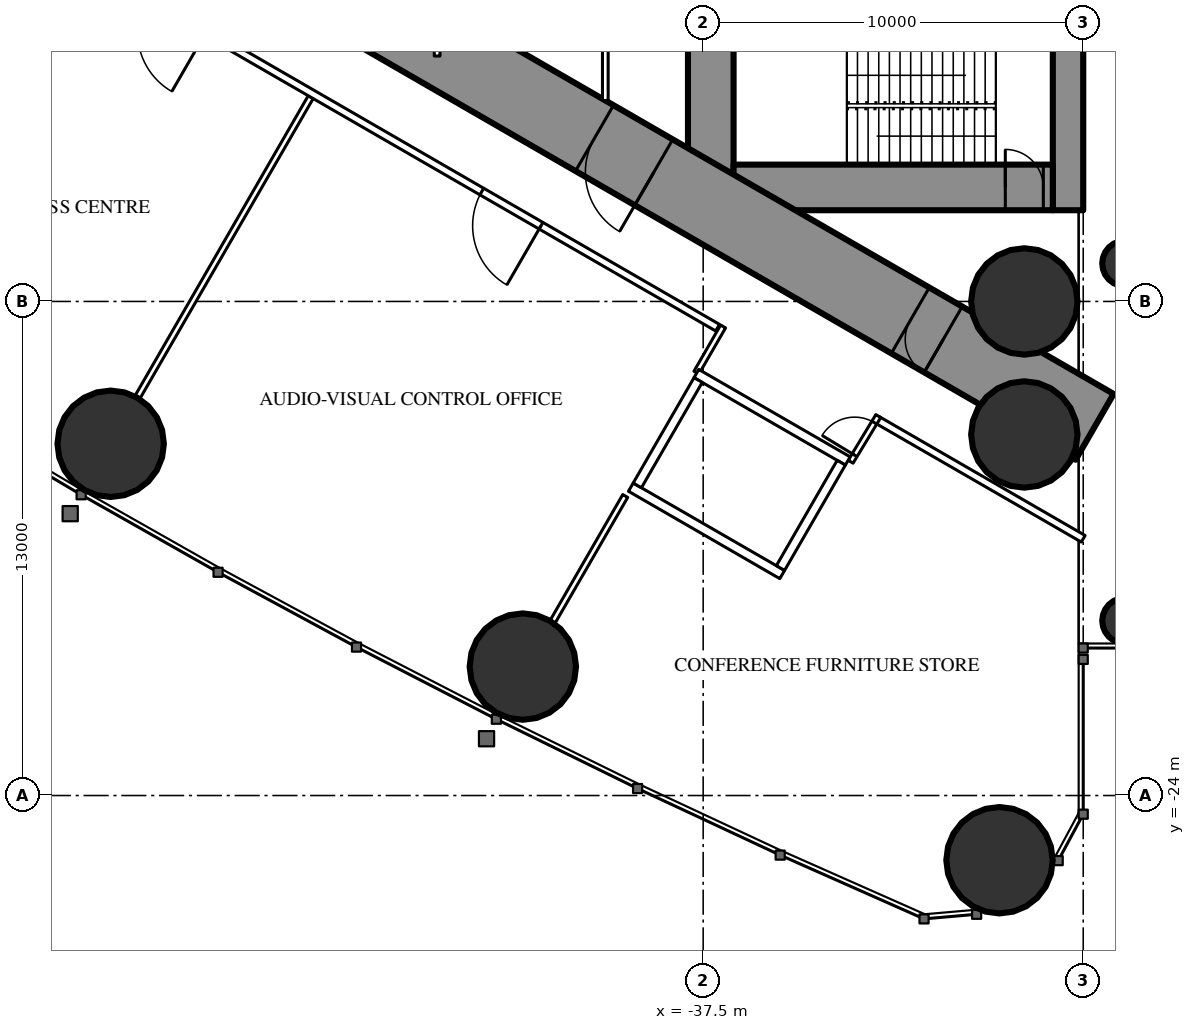
"""IFC4 building model, lengths in metres.
Left out: names, types, materials, properties, quantities, classifications, styles, units other than length and angle.
Written with IfcOpenShell. Run it as: python <this file> out.ifc"""

import sys

from ifc_helpers import new_model, si_unit, direction, frame, frame_2d, origin, origin_2d, place, context, subcontext, project, spatial, rectangle, circle, hollow_circle, extrude, element, fill, save


model = new_model("IFC4")
c1 = context("Model", 3, precision=1e-05, world=origin(), true_north=direction((0.0, 1.0)))
c2 = subcontext(c1, "Body", "Model", "MODEL_VIEW")
j1 = project(units=[si_unit("LENGTHUNIT", "METRE"), si_unit("PLANEANGLEUNIT", "RADIAN")], contexts=[c1])
p1 = place(None, origin())
s1 = spatial("IfcSite", under=j1, at=p1, CompositionType="ELEMENT")
p2 = place(p1, origin())
s2 = spatial("IfcBuilding", under=s1, at=p2, CompositionType="ELEMENT")
p3 = place(p2, frame((0.0, 0.0, 7.2)))
s3 = spatial("IfcBuildingStorey", under=s2, at=p3, CompositionType="ELEMENT", Elevation=7.2)
for number, where, z_axis, x_axis in (
    (1, (-29.703, -25.703, 0.0), (0.0, 0.0, 1.0), (1.0, 0.0, 0.0)),
    (2, (-29.05, -11.0, 0.0), (0.0, 0.0, 1.0), (1.0, 0.0, 0.0)),
    (3, (-29.05, -14.5, 0.0), (0.0, 0.0, 1.0), (1.0, 0.0, 0.0)),
    (4, (-53.09, -14.745, 0.0), (0.0, 0.0, 1.0), (1.0, 0.0, 0.0)),
    (5, (-42.245, -20.607, 0.0), (0.0, 0.0, 1.0), (1.0, 0.0, 0.0)),
):
    element("IfcColumn", number, at=place(p3, frame(where, z_axis=z_axis, x_axis=x_axis)), inside=s3, PredefinedType="COLUMN", context=c2, shape_type="SweptSolid", body=[
        extrude(hollow_circle(Radius=1.4, WallThickness=0.12, at=origin_2d()), origin(), (0.0, 0.0, 1.0), 5.4),
    ])
p4 = place(p3, frame((-27.9, 8.6, 0.0), z_axis=(0.0, 0.0, 1.0), x_axis=(0.0, -1.0, 0.0)))
e6 = element("IfcWall", 6, at=p4, inside=s3, PredefinedType="SHEAR", context=c2, shape_type="SweptSolid", body=[
    extrude(rectangle(XDim=17.2, YDim=0.8, at=frame_2d((8.6, 0.0))), origin(), (0.0, 0.0, 1.0), 5.4),
])
p5 = place(p3, frame((-37.3, 8.6, 0.0), z_axis=(0.0, 0.0, 1.0), x_axis=(0.0, -1.0, 0.0)))
e7 = element("IfcWall", 7, at=p5, inside=s3, PredefinedType="SHEAR", context=c2, shape_type="SweptSolid", body=[
    extrude(rectangle(XDim=17.2, YDim=1.2, at=frame_2d((8.6, 0.0))), origin(), (0.0, 0.0, 1.0), 5.4),
])
p6 = place(p5, frame((7.7, 0.0, 0.0)))
e8 = element("IfcOpeningElement", 8, at=p6, cuts=e7, PredefinedType="OPENING", context=c2, shape_type="SweptSolid", body=[
    extrude(rectangle(XDim=1.8, YDim=2.2, at=frame_2d((0.9, 1.1))), frame((0.0, 0.61, 0.0), z_axis=(0.0, -1.0, 0.0), x_axis=(1.0, 0.0, 0.0)), (0.0, 0.0, 1.0), 1.22),
])
p7 = place(p3, frame((-28.3, -8.0, 0.0), z_axis=(0.0, 0.0, 1.0), x_axis=(-1.0, 0.0, 0.0)))
e9 = element("IfcWall", 9, at=p7, inside=s3, PredefinedType="SHEAR", context=c2, shape_type="SweptSolid", body=[
    extrude(rectangle(XDim=8.4, YDim=1.2, at=frame_2d((4.2, 0.0))), origin(), (0.0, 0.0, 1.0), 5.4),
])
p8 = place(p7, frame((0.25, 0.0, 0.0)))
e10 = element("IfcOpeningElement", 10, at=p8, cuts=e9, PredefinedType="OPENING", context=c2, shape_type="SweptSolid", body=[
    extrude(rectangle(XDim=1.0, YDim=2.2, at=frame_2d((0.5, 1.1))), frame((0.0, 0.61, 0.0), z_axis=(0.0, -1.0, 0.0), x_axis=(1.0, 0.0, 0.0)), (0.0, 0.0, 1.0), 1.22),
])
p9 = place(p3, frame((-27.2, -14.3, 0.0), z_axis=(0.0, 0.0, 1.0), x_axis=(-0.866024044937, 0.500002353585, 0.0)))
e11 = element("IfcWall", 11, at=p9, inside=s3, PredefinedType="SHEAR", context=c2, shape_type="SweptSolid", body=[
    extrude(rectangle(XDim=27.533, YDim=2.0, at=frame_2d((13.767, 0.0))), origin(), (0.0, 0.0, 1.0), 5.4),
])
p10 = place(p9, frame((4.6, 0.0, 0.0)))
e12 = element("IfcOpeningElement", 12, at=p10, cuts=e11, PredefinedType="OPENING", context=c2, shape_type="SweptSolid", body=[
    extrude(rectangle(XDim=1.0, YDim=2.2, at=frame_2d((0.5, 1.1))), frame((0.0, 1.01, 0.0), z_axis=(0.0, -1.0, 0.0), x_axis=(1.0, 0.0, 0.0)), (0.0, 0.0, 1.0), 2.02),
])
p11 = place(p9, frame((13.395, 0.0, 0.0)))
e13 = element("IfcOpeningElement", 13, at=p11, cuts=e11, PredefinedType="OPENING", context=c2, shape_type="SweptSolid", body=[
    extrude(rectangle(XDim=1.8, YDim=2.2, at=frame_2d((0.9, 1.1))), frame((0.0, 1.01, 0.0), z_axis=(0.0, -1.0, 0.0), x_axis=(1.0, 0.0, 0.0)), (0.0, 0.0, 1.0), 2.02),
])
for number, where, z_axis, x_axis in (
    (14, (-26.4, -19.4, 0.0), (0.0, 0.0, 1.0), (1.0, 0.0, 0.0)),
    (15, (-26.4, -10.0, 0.0), (0.0, 0.0, 1.0), (1.0, 0.0, 0.0)),
):
    element("IfcColumn", number, at=place(p3, frame(where, z_axis=z_axis, x_axis=x_axis)), inside=s3, PredefinedType="COLUMN", context=c2, shape_type="SweptSolid", body=[
        extrude(circle(Radius=0.6, at=origin_2d()), origin(), (0.0, 0.0, 1.0), 5.4),
    ])
p12 = place(p3, frame((-47.827, -5.624, 0.0), z_axis=(0.0, 0.0, 1.0), x_axis=(-0.499995404498, -0.866028056982, 0.0)))
e16 = element("IfcWall", 16, at=p12, inside=s3, PredefinedType="PARTITIONING", context=c2, shape_type="SweptSolid", body=[
    extrude(rectangle(XDim=9.11, YDim=0.15, at=frame_2d((4.555, 0.0))), origin(), (0.0, 0.0, 1.0), 4.05),
])
p13 = place(p3, frame((-39.551, -16.118, 0.0), z_axis=(0.0, 0.0, 1.0), x_axis=(-0.499986503906, -0.866033195618, 0.0)))
e17 = element("IfcWall", 17, at=p13, inside=s3, PredefinedType="PARTITIONING", context=c2, shape_type="SweptSolid", body=[
    extrude(rectangle(XDim=3.815, YDim=0.15, at=frame_2d((1.907, 0.0))), origin(), (0.0, 0.0, 1.0), 5.05),
])
p14 = place(p3, frame((-27.5, -17.244, 0.0), z_axis=(0.0, 0.0, 1.0), x_axis=(-0.866027347857, 0.499996632752, 0.0)))
e18 = element("IfcWall", 18, at=p14, inside=s3, PredefinedType="PARTITIONING", context=c2, shape_type="SweptSolid", body=[
    extrude(rectangle(XDim=6.269, YDim=0.2, at=frame_2d((3.135, 0.0))), origin(), (0.0, 0.0, 1.0), 5.05),
])
p15 = place(p3, frame((-37.12, -11.69, 0.0), z_axis=(0.0, 0.0, 1.0), x_axis=(-0.866028803602, 0.499994111297, 0.0)))
e19 = element("IfcWall", 19, at=p15, inside=s3, PredefinedType="PARTITIONING", context=c2, shape_type="SweptSolid", body=[
    extrude(rectangle(XDim=23.26, YDim=0.2, at=frame_2d((11.63, 0.0))), origin(), (0.0, 0.0, 1.0), 5.05),
])
p16 = place(p15, frame((20.909, 0.0, 0.0)))
e20 = element("IfcOpeningElement", 20, at=p16, cuts=e19, PredefinedType="OPENING", context=c2, shape_type="SweptSolid", body=[
    extrude(rectangle(XDim=1.8, YDim=2.2, at=frame_2d((0.9, 1.1))), frame((0.0, 0.11, 0.0), z_axis=(0.0, -1.0, 0.0), x_axis=(1.0, 0.0, 0.0)), (0.0, 0.0, 1.0), 0.22),
])
p17 = place(p15, frame((15.544, 0.0, 0.0)))
e21 = element("IfcOpeningElement", 21, at=p17, cuts=e19, PredefinedType="OPENING", context=c2, shape_type="SweptSolid", body=[
    extrude(rectangle(XDim=1.8, YDim=2.2, at=frame_2d((0.9, 1.1))), frame((0.0, 0.11, 0.0), z_axis=(0.0, -1.0, 0.0), x_axis=(1.0, 0.0, 0.0)), (0.0, 0.0, 1.0), 0.22),
])
p18 = place(p15, frame((5.365, 0.0, 0.0)))
e22 = element("IfcOpeningElement", 22, at=p18, cuts=e19, PredefinedType="OPENING", context=c2, shape_type="SweptSolid", body=[
    extrude(rectangle(XDim=1.8, YDim=2.2, at=frame_2d((0.9, 1.1))), frame((0.0, 0.11, 0.0), z_axis=(0.0, -1.0, 0.0), x_axis=(1.0, 0.0, 0.0)), (0.0, 0.0, 1.0), 0.22),
])
p19 = place(p3, frame((-36.976, -11.658, 0.0), z_axis=(0.0, 0.0, 1.0), x_axis=(-0.50008355685, -0.86597715684, 0.0)))
e23 = element("IfcWall", 23, at=p19, inside=s3, PredefinedType="PARTITIONING", context=c2, shape_type="SweptSolid", body=[
    extrude(rectangle(XDim=1.405, YDim=0.15, at=frame_2d((0.702, 0.0))), origin(), (0.0, 0.0, 1.0), 5.05),
])
p20 = place(p3, frame((-33.621, -15.218, 0.0), z_axis=(0.0, 0.0, 1.0), x_axis=(0.518424923641, 0.855123148177, 0.0)))
e24 = element("IfcWall", 24, at=p20, inside=s3, PredefinedType="PARTITIONING", context=c2, shape_type="SweptSolid", body=[
    extrude(rectangle(XDim=1.405, YDim=0.15, at=frame_2d((0.703, 0.0))), origin(), (0.0, 0.0, 1.0), 5.05),
])
p21 = place(p20, frame((0.203, 0.0, 0.0)))
e25 = element("IfcOpeningElement", 25, at=p21, cuts=e24, PredefinedType="OPENING", context=c2, shape_type="SweptSolid", body=[
    extrude(rectangle(XDim=1.0, YDim=2.2, at=frame_2d((0.5, 1.1))), frame((0.0, 0.085, 0.0), z_axis=(0.0, -1.0, 0.0), x_axis=(1.0, 0.0, 0.0)), (0.0, 0.0, 1.0), 0.17),
])
p22 = place(p3, frame((-40.075, 5.712, 0.0), z_axis=(0.0, 0.0, 1.0), x_axis=(0.0, -1.0, 0.0)))
e26 = element("IfcWall", 26, at=p22, inside=s3, PredefinedType="PARTITIONING", context=c2, shape_type="SweptSolid", body=[
    extrude(rectangle(XDim=11.424, YDim=0.15, at=frame_2d((5.712, 0.0))), origin(), (0.0, 0.0, 1.0), 5.05),
])
p23 = place(p22, frame((4.812, 0.0, 0.0)))
e27 = element("IfcOpeningElement", 27, at=p23, cuts=e26, PredefinedType="OPENING", context=c2, shape_type="SweptSolid", body=[
    extrude(rectangle(XDim=1.8, YDim=2.2, at=frame_2d((0.9, 1.1))), frame((0.0, 0.085, 0.0), z_axis=(0.0, -1.0, 0.0), x_axis=(1.0, 0.0, 0.0)), (0.0, 0.0, 1.0), 0.17),
])
p24 = place(p3, frame((-44.5, 4.543, 0.0), z_axis=(0.0, 0.0, 1.0), x_axis=(0.0, -1.0, 0.0)))
e28 = element("IfcWall", 28, at=p24, inside=s3, PredefinedType="PARTITIONING", context=c2, shape_type="SweptSolid", body=[
    extrude(rectangle(XDim=9.085, YDim=0.15, at=frame_2d((4.543, 0.0))), origin(), (0.0, 0.0, 1.0), 5.05),
])
p25 = place(p24, frame((4.043, 0.0, 0.0)))
e29 = element("IfcOpeningElement", 29, at=p25, cuts=e28, PredefinedType="OPENING", context=c2, shape_type="SweptSolid", body=[
    extrude(rectangle(XDim=1.0, YDim=2.2, at=frame_2d((0.5, 1.1))), frame((0.0, 0.085, 0.0), z_axis=(0.0, -1.0, 0.0), x_axis=(1.0, 0.0, 0.0)), (0.0, 0.0, 1.0), 0.17),
])
p26 = place(p3, frame((-33.696, -15.197, 0.0), z_axis=(0.0, 0.0, 1.0), x_axis=(-0.865976953817, 0.500083908417, 0.0)))
e30 = element("IfcWall", 30, at=p26, inside=s3, PredefinedType="PARTITIONING", context=c2, shape_type="SweptSolid", body=[
    extrude(rectangle(XDim=4.599, YDim=0.25, at=frame_2d((2.3, 0.0))), origin(), (0.0, 0.0, 1.0), 5.05),
])
p27 = place(p3, frame((-35.42, -18.186, 0.0), z_axis=(0.0, 0.0, 1.0), x_axis=(-0.865990227814, 0.50006092162, 0.0)))
e31 = element("IfcWall", 31, at=p27, inside=s3, PredefinedType="PARTITIONING", context=c2, shape_type="SweptSolid", body=[
    extrude(rectangle(XDim=4.6, YDim=0.25, at=frame_2d((2.3, 0.0))), origin(), (0.0, 0.0, 1.0), 5.05),
])
p28 = place(p3, frame((-33.866, -15.243, 0.0), z_axis=(0.0, 0.0, 1.0), x_axis=(-0.499929347863, -0.866066190972, 0.0)))
e32 = element("IfcWall", 32, at=p28, inside=s3, PredefinedType="PARTITIONING", context=c2, shape_type="SweptSolid", body=[
    extrude(rectangle(XDim=3.201, YDim=0.25, at=frame_2d((1.6, 0.0))), origin(), (0.0, 0.0, 1.0), 5.05),
])
p29 = place(p3, frame((-37.633, -13.068, 0.0), z_axis=(0.0, 0.0, 1.0), x_axis=(-0.499872130319, -0.866099216793, 0.0)))
e33 = element("IfcWall", 33, at=p29, inside=s3, PredefinedType="PARTITIONING", context=c2, shape_type="SweptSolid", body=[
    extrude(rectangle(XDim=3.2, YDim=0.25, at=frame_2d((1.6, 0.0))), origin(), (0.0, 0.0, 1.0), 5.05),
])
p30 = place(p18, origin())
e34 = element("IfcDoor", 34, at=p30, inside=s3, OperationType="DOUBLE_DOOR_SINGLE_SWING", PredefinedType="DOOR", context=c2, shape_type="SweptSolid", body=[
    extrude(rectangle(XDim=1.8, YDim=2.2, at=frame_2d((0.9, 1.1))), frame((0.0, 0.025, 0.0), z_axis=(0.0, -1.0, 0.0), x_axis=(1.0, 0.0, 0.0)), (0.0, 0.0, 1.0), 0.05),
])
fill(e22, e34)
p31 = place(p21, origin())
e35 = element("IfcDoor", 35, at=p31, inside=s3, OperationType="SINGLE_SWING_LEFT", PredefinedType="DOOR", context=c2, shape_type="SweptSolid", body=[
    extrude(rectangle(XDim=1.0, YDim=2.2, at=frame_2d((0.5, 1.1))), frame((0.0, 0.025, 0.0), z_axis=(0.0, -1.0, 0.0), x_axis=(1.0, 0.0, 0.0)), (0.0, 0.0, 1.0), 0.05),
])
fill(e25, e35)
p32 = place(p10, origin())
e36 = element("IfcDoor", 36, at=p32, inside=s3, OperationType="SINGLE_SWING_LEFT", PredefinedType="DOOR", context=c2, shape_type="SweptSolid", body=[
    extrude(rectangle(XDim=1.0, YDim=2.2, at=frame_2d((0.5, 1.1))), frame((0.0, 0.025, 0.0), z_axis=(0.0, -1.0, 0.0), x_axis=(1.0, 0.0, 0.0)), (0.0, 0.0, 1.0), 0.05),
])
fill(e12, e36)
p33 = place(p11, origin())
e37 = element("IfcDoor", 37, at=p33, inside=s3, OperationType="DOUBLE_DOOR_SINGLE_SWING", PredefinedType="DOOR", context=c2, shape_type="SweptSolid", body=[
    extrude(rectangle(XDim=1.8, YDim=2.2, at=frame_2d((0.9, 1.1))), frame((0.0, 0.025, 0.0), z_axis=(0.0, -1.0, 0.0), x_axis=(1.0, 0.0, 0.0)), (0.0, 0.0, 1.0), 0.05),
])
fill(e13, e37)
p34 = place(p8, origin())
e38 = element("IfcDoor", 38, at=p34, inside=s3, OperationType="SINGLE_SWING_RIGHT", PredefinedType="DOOR", context=c2, shape_type="SweptSolid", body=[
    extrude(rectangle(XDim=1.0, YDim=2.2, at=frame_2d((0.5, 1.1))), frame((0.0, 0.025, 0.0), z_axis=(0.0, -1.0, 0.0), x_axis=(1.0, 0.0, 0.0)), (0.0, 0.0, 1.0), 0.05),
])
fill(e10, e38)
save(model, sys.argv[1])
